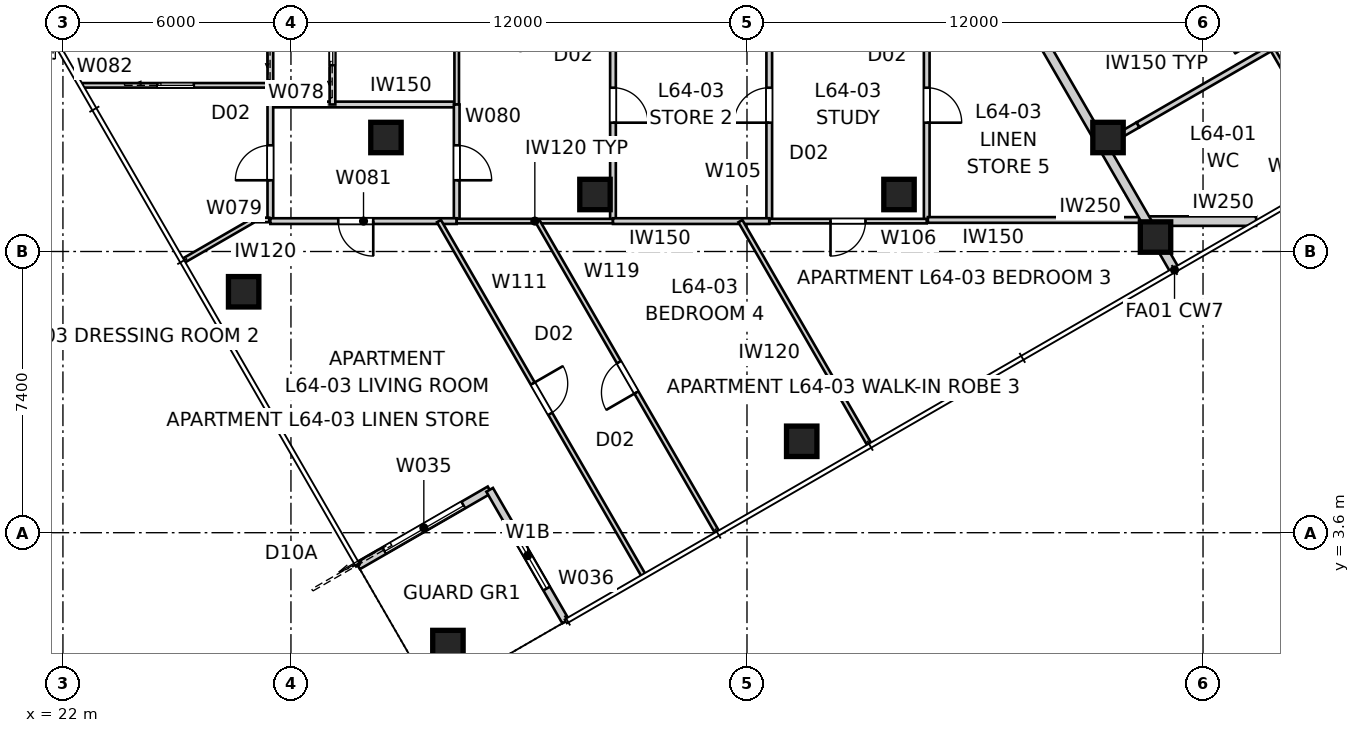
"""IFC4 building model, lengths in metres.
Left out: names, types, materials, properties, quantities, classifications, styles, units other than length and angle.
Written with IfcOpenShell. Run it as: python <this file> out.ifc"""

import sys

from ifc_helpers import new_model, si_unit, direction, frame, frame_2d, origin, origin_2d, place, context, subcontext, project, spatial, rectangle, extrude, element, fill, save


model = new_model("IFC4")
c1 = context("Model", 3, precision=1e-05, world=origin(), true_north=direction((0.0, 1.0)))
c2 = subcontext(c1, "Body", "Model", "MODEL_VIEW")
j1 = project(units=[si_unit("LENGTHUNIT", "METRE"), si_unit("PLANEANGLEUNIT", "RADIAN")], contexts=[c1])
p1 = place(None, origin())
s1 = spatial("IfcSite", under=j1, at=p1, CompositionType="ELEMENT")
p2 = place(p1, origin())
s2 = spatial("IfcBuilding", under=s1, at=p2, CompositionType="ELEMENT")
p3 = place(p2, frame((0.0, 0.0, 232.0)))
s3 = spatial("IfcBuildingStorey", under=s2, at=p3, CompositionType="ELEMENT", Elevation=232.0)
for number, where, z_axis, x_axis in (
    (1, (32.13, 0.63, 0.0), (0.0, 0.0, 1.0), (1.0, 0.0, 0.0)),
    (2, (41.44, 6.005, 0.0), (0.0, 0.0, 1.0), (1.0, 0.0, 0.0)),
    (3, (50.75, 11.38, 0.0), (0.0, 0.0, 1.0), (1.0, 0.0, 0.0)),
    (4, (26.755, 9.94, 0.0), (0.0, 0.0, 1.0), (1.0, 0.0, 0.0)),
):
    element("IfcColumn", number, at=place(p3, frame(where, z_axis=z_axis, x_axis=x_axis)), inside=s3, PredefinedType="COLUMN", context=c2, shape_type="SweptSolid", body=[
        extrude(rectangle(XDim=0.8, YDim=0.8, at=origin_2d()), origin(), (0.0, 0.0, 1.0), 3.2),
    ])
for number, where, z_axis, x_axis in (
    (5, (30.5, 14.0, 0.0), (0.0, 0.0, 1.0), (1.0, 0.0, 0.0)),
    (6, (36.0, 12.5, 0.0), (0.0, 0.0, 1.0), (1.0, 0.0, 0.0)),
    (7, (44.0, 12.5, 0.0), (0.0, 0.0, 1.0), (1.0, 0.0, 0.0)),
    (8, (49.5, 14.0, 0.0), (0.0, 0.0, 1.0), (1.0, 0.0, 0.0)),
):
    element("IfcColumn", number, at=place(p3, frame(where, z_axis=z_axis, x_axis=x_axis)), inside=s3, PredefinedType="COLUMN", context=c2, shape_type="SweptSolid", body=[
        extrude(rectangle(XDim=0.8, YDim=0.8, at=origin_2d()), origin(), (0.0, 0.0, 1.0), 3.4),
    ])
p4 = place(p3, frame((29.764, 2.729, 0.0), z_axis=(0.0, 0.0, 1.0), x_axis=(0.866026010844, 0.49999894854, 0.0)))
e9 = element("IfcWall", 9, at=p4, inside=s3, PredefinedType="SOLIDWALL", context=c2, shape_type="SweptSolid", body=[
    extrude(rectangle(XDim=4.0, YDim=0.2, at=frame_2d((2.0, 0.0))), origin(), (0.0, 0.0, 1.0), 3.2),
])
p5 = place(p4, frame((0.8, 0.0, 0.0)))
e10 = element("IfcOpeningElement", 10, at=p5, cuts=e9, PredefinedType="OPENING", context=c2, shape_type="SweptSolid", body=[
    extrude(rectangle(XDim=2.4, YDim=2.1, at=frame_2d((1.2, 1.05))), frame((0.0, 0.11, 0.0), z_axis=(0.0, -1.0, 0.0), x_axis=(1.0, 0.0, 0.0)), (0.0, 0.0, 1.0), 0.22),
])
p6 = place(p3, frame((33.229, 4.729, 0.0), z_axis=(0.0, 0.0, 1.0), x_axis=(0.49999894854, -0.866026010844, 0.0)))
e11 = element("IfcWall", 11, at=p6, inside=s3, PredefinedType="SOLIDWALL", context=c2, shape_type="SweptSolid", body=[
    extrude(rectangle(XDim=4.0, YDim=0.2, at=frame_2d((2.0, 0.0))), origin(), (0.0, 0.0, 1.0), 3.2),
])
p7 = place(p6, frame((1.0, 0.0, 0.4)))
e12 = element("IfcOpeningElement", 12, at=p7, cuts=e11, PredefinedType="OPENING", context=c2, shape_type="SweptSolid", body=[
    extrude(rectangle(XDim=2.0, YDim=1.8, at=frame_2d((1.0, 0.9))), frame((0.0, 0.11, 0.0), z_axis=(0.0, -1.0, 0.0), x_axis=(1.0, 0.0, 0.0)), (0.0, 0.0, 1.0), 0.22),
])
p8 = place(p3, frame((51.25, 10.514, 0.0), z_axis=(0.0, 0.0, 1.0), x_axis=(-0.500008511703, 0.866020489494, 0.0)))
e13 = element("IfcWall", 13, at=p8, inside=s3, PredefinedType="PARTITIONING", context=c2, shape_type="SweptSolid", body=[
    extrude(rectangle(XDim=8.496, YDim=0.25, at=frame_2d((4.248, 0.0))), origin(), (0.0, 0.0, 1.0), 3.2),
])
p9 = place(p3, frame((55.678, 13.117, 0.0), z_axis=(0.0, 0.0, 1.0), x_axis=(-0.500024807712, 0.866011080572, 0.0)))
e14 = element("IfcWall", 14, at=p9, inside=s3, PredefinedType="PARTITIONING", context=c2, shape_type="SweptSolid", body=[
    extrude(rectangle(XDim=3.798, YDim=0.12, at=frame_2d((1.899, 0.0))), origin(), (0.0, 0.0, 1.0), 3.2),
])
p10 = place(p9, frame((1.399, 0.0, 0.0)))
e15 = element("IfcOpeningElement", 15, at=p10, cuts=e14, PredefinedType="OPENING", context=c2, shape_type="SweptSolid", body=[
    extrude(rectangle(XDim=0.96, YDim=2.1, at=frame_2d((0.48, 1.05))), frame((0.0, 0.07, 0.0), z_axis=(0.0, -1.0, 0.0), x_axis=(1.0, 0.0, 0.0)), (0.0, 0.0, 1.0), 0.14),
])
p11 = place(p3, frame((49.356, 13.795, 0.0), z_axis=(0.0, 0.0, 1.0), x_axis=(0.866087482489, 0.499892461112, 0.0)))
e16 = element("IfcWall", 16, at=p11, inside=s3, PredefinedType="SOLIDWALL", context=c2, shape_type="SweptSolid", body=[
    extrude(rectangle(XDim=1.077, YDim=0.15, at=frame_2d((0.539, 0.0))), origin(), (0.0, 0.0, 1.0), 2.0),
])
p12 = place(p3, frame((50.289, 14.333, 0.0), z_axis=(0.0, 0.0, 1.0), x_axis=(0.866002269112, 0.500040068287, 0.0)))
e17 = element("IfcWall", 17, at=p12, inside=s3, PredefinedType="SOLIDWALL", context=c2, shape_type="SweptSolid", body=[
    extrude(rectangle(XDim=4.059, YDim=0.15, at=frame_2d((2.029, 0.0))), origin(), (0.0, 0.0, 1.0), 3.2),
])
p13 = place(p3, frame((53.397, 11.8, 0.0), z_axis=(0.0, 0.0, 1.0), x_axis=(-1.0, 0.0, 0.0)))
e18 = element("IfcWall", 18, at=p13, inside=s3, PredefinedType="PARTITIONING", context=c2, shape_type="SweptSolid", body=[
    extrude(rectangle(XDim=2.889, YDim=0.25, at=frame_2d((1.444, 0.0))), origin(), (0.0, 0.0, 1.0), 3.2),
])
p14 = place(p3, frame((32.361, 14.869, 0.0), z_axis=(0.0, 0.0, 1.0), x_axis=(-1.0, 0.0, 0.0)))
e19 = element("IfcWall", 19, at=p14, inside=s3, PredefinedType="SOLIDWALL", context=c2, shape_type="SweptSolid", body=[
    extrude(rectangle(XDim=4.903, YDim=0.15, at=frame_2d((2.452, 0.0))), origin(), (0.0, 0.0, 1.0), 3.2),
])
p15 = place(p3, frame((32.361, 17.9, 0.0), z_axis=(0.0, 0.0, 1.0), x_axis=(0.0, -1.0, 0.0)))
e20 = element("IfcWall", 20, at=p15, inside=s3, PredefinedType="PARTITIONING", context=c2, shape_type="SweptSolid", body=[
    extrude(rectangle(XDim=3.031, YDim=0.12, at=frame_2d((1.516, 0.0))), origin(), (0.0, 0.0, 1.0), 3.2),
])
p16 = place(p3, frame((29.092, 14.869, 0.0), z_axis=(0.0, 0.0, 1.0), x_axis=(0.0, 1.0, 0.0)))
e21 = element("IfcWall", 21, at=p16, inside=s3, PredefinedType="SOLIDWALL", context=c2, shape_type="SweptSolid", body=[
    extrude(rectangle(XDim=3.031, YDim=0.15, at=frame_2d((1.516, 0.0))), origin(), (0.0, 0.0, 1.0), 3.2),
])
p17 = place(p16, frame((1.036, 0.0, 0.0)))
e22 = element("IfcOpeningElement", 22, at=p17, cuts=e21, PredefinedType="OPENING", context=c2, shape_type="SweptSolid", body=[
    extrude(rectangle(XDim=0.96, YDim=2.1, at=frame_2d((0.48, 1.05))), frame((0.0, 0.085, 0.0), z_axis=(0.0, -1.0, 0.0), x_axis=(1.0, 0.0, 0.0)), (0.0, 0.0, 1.0), 0.17),
])
p18 = place(p3, frame((27.458, 11.8, 0.0), z_axis=(0.0, 0.0, 1.0), x_axis=(0.0, 1.0, 0.0)))
e23 = element("IfcWall", 23, at=p18, inside=s3, PredefinedType="SOLIDWALL", context=c2, shape_type="SweptSolid", body=[
    extrude(rectangle(XDim=6.495, YDim=0.15, at=frame_2d((3.248, 0.0))), origin(), (0.0, 0.0, 1.0), 3.2),
])
p19 = place(p18, frame((4.569, 0.0, 0.0)))
e24 = element("IfcOpeningElement", 24, at=p19, cuts=e23, PredefinedType="OPENING", context=c2, shape_type="SweptSolid", body=[
    extrude(rectangle(XDim=0.96, YDim=2.0, at=frame_2d((0.48, 1.0))), frame((0.0, 0.085, 0.0), z_axis=(0.0, -1.0, 0.0), x_axis=(1.0, 0.0, 0.0)), (0.0, 0.0, 1.0), 0.17),
])
p20 = place(p18, frame((1.074, 0.0, 0.0)))
e25 = element("IfcOpeningElement", 25, at=p20, cuts=e23, PredefinedType="OPENING", context=c2, shape_type="SweptSolid", body=[
    extrude(rectangle(XDim=0.92, YDim=2.34, at=frame_2d((0.46, 1.17))), frame((0.0, 0.085, 0.0), z_axis=(0.0, -1.0, 0.0), x_axis=(1.0, 0.0, 0.0)), (0.0, 0.0, 1.0), 0.17),
])
p21 = place(p3, frame((32.361, 14.869, 0.0), z_axis=(0.0, 0.0, 1.0), x_axis=(0.0, -1.0, 0.0)))
e26 = element("IfcWall", 26, at=p21, inside=s3, PredefinedType="SOLIDWALL", context=c2, shape_type="SweptSolid", body=[
    extrude(rectangle(XDim=3.069, YDim=0.15, at=frame_2d((1.534, 0.0))), origin(), (0.0, 0.0, 1.0), 3.2),
])
p22 = place(p21, frame((1.074, 0.0, 0.0)))
e27 = element("IfcOpeningElement", 27, at=p22, cuts=e26, PredefinedType="OPENING", context=c2, shape_type="SweptSolid", body=[
    extrude(rectangle(XDim=0.92, YDim=2.1, at=frame_2d((0.46, 1.05))), frame((0.0, 0.085, 0.0), z_axis=(0.0, -1.0, 0.0), x_axis=(1.0, 0.0, 0.0)), (0.0, 0.0, 1.0), 0.17),
])
p23 = place(p3, frame((32.361, 11.8, 0.0), z_axis=(0.0, 0.0, 1.0), x_axis=(-1.0, 0.0, 0.0)))
e28 = element("IfcWall", 28, at=p23, inside=s3, PredefinedType="SOLIDWALL", context=c2, shape_type="SweptSolid", body=[
    extrude(rectangle(XDim=4.903, YDim=0.15, at=frame_2d((2.452, 0.0))), origin(), (0.0, 0.0, 1.0), 3.2),
])
p24 = place(p23, frame((2.196, 0.0, 0.0)))
e29 = element("IfcOpeningElement", 29, at=p24, cuts=e28, PredefinedType="OPENING", context=c2, shape_type="SweptSolid", body=[
    extrude(rectangle(XDim=0.92, YDim=2.34, at=frame_2d((0.46, 1.17))), frame((0.0, 0.085, 0.0), z_axis=(0.0, -1.0, 0.0), x_axis=(1.0, 0.0, 0.0)), (0.0, 0.0, 1.0), 0.17),
])
p25 = place(p3, frame((22.51, 15.373, 0.0), z_axis=(0.0, 0.0, 1.0), x_axis=(1.0, 0.0, 0.0)))
e30 = element("IfcWall", 30, at=p25, inside=s3, PredefinedType="PARTITIONING", context=c2, shape_type="SweptSolid", body=[
    extrude(rectangle(XDim=4.918, YDim=0.12, at=frame_2d((2.459, 0.0))), origin(), (0.0, 0.0, 1.0), 3.2),
])
p26 = place(p25, frame((1.973, 0.0, 0.0)))
e31 = element("IfcOpeningElement", 31, at=p26, cuts=e30, PredefinedType="OPENING", context=c2, shape_type="SweptSolid", body=[
    extrude(rectangle(XDim=0.96, YDim=2.1, at=frame_2d((0.48, 1.05))), frame((0.0, 0.07, 0.0), z_axis=(0.0, -1.0, 0.0), x_axis=(1.0, 0.0, 0.0)), (0.0, 0.0, 1.0), 0.14),
])
p27 = place(p3, frame((27.428, 11.83, 0.0), z_axis=(0.0, 0.0, 1.0), x_axis=(-1.0, 0.0, 0.0)))
e32 = element("IfcWall", 32, at=p27, inside=s3, PredefinedType="PARTITIONING", context=c2, shape_type="SweptSolid", body=[
    extrude(rectangle(XDim=0.421, YDim=0.12, at=frame_2d((0.211, 0.0))), origin(), (0.0, 0.0, 1.0), 3.2),
])
p28 = place(p3, frame((26.976, 11.8, 0.0), z_axis=(0.0, 0.0, 1.0), x_axis=(-0.866046860819, -0.499962833484, 0.0)))
e33 = element("IfcWall", 33, at=p28, inside=s3, PredefinedType="PARTITIONING", context=c2, shape_type="SweptSolid", body=[
    extrude(rectangle(XDim=2.081, YDim=0.12, at=frame_2d((1.041, 0.0))), origin(), (0.0, 0.0, 1.0), 3.2),
])
p29 = place(p3, frame((44.729, 17.9, 0.0), z_axis=(0.0, 0.0, 1.0), x_axis=(0.0, -1.0, 0.0)))
e34 = element("IfcWall", 34, at=p29, inside=s3, PredefinedType="SOLIDWALL", context=c2, shape_type="SweptSolid", body=[
    extrude(rectangle(XDim=6.1, YDim=0.15, at=frame_2d((3.05, 0.0))), origin(), (0.0, 0.0, 1.0), 3.2),
])
p30 = place(p29, frame((2.59, 0.0, 0.0)))
e35 = element("IfcOpeningElement", 35, at=p30, cuts=e34, PredefinedType="OPENING", context=c2, shape_type="SweptSolid", body=[
    extrude(rectangle(XDim=0.92, YDim=2.34, at=frame_2d((0.46, 1.17))), frame((0.0, 0.085, 0.0), z_axis=(0.0, -1.0, 0.0), x_axis=(1.0, 0.0, 0.0)), (0.0, 0.0, 1.0), 0.17),
])
p31 = place(p3, frame((40.586, 11.8, 0.0), z_axis=(0.0, 0.0, 1.0), x_axis=(0.0, 1.0, 0.0)))
e36 = element("IfcWall", 36, at=p31, inside=s3, PredefinedType="SOLIDWALL", context=c2, shape_type="SweptSolid", body=[
    extrude(rectangle(XDim=6.1, YDim=0.15, at=frame_2d((3.05, 0.0))), origin(), (0.0, 0.0, 1.0), 3.2),
])
p32 = place(p31, frame((2.59, 0.0, 0.0)))
e37 = element("IfcOpeningElement", 37, at=p32, cuts=e36, PredefinedType="OPENING", context=c2, shape_type="SweptSolid", body=[
    extrude(rectangle(XDim=0.92, YDim=2.34, at=frame_2d((0.46, 1.17))), frame((0.0, 0.085, 0.0), z_axis=(0.0, -1.0, 0.0), x_axis=(1.0, 0.0, 0.0)), (0.0, 0.0, 1.0), 0.17),
])
p33 = place(p3, frame((44.729, 11.8, 0.0), z_axis=(0.0, 0.0, 1.0), x_axis=(-1.0, 0.0, 0.0)))
e38 = element("IfcWall", 38, at=p33, inside=s3, PredefinedType="PARTITIONING", context=c2, shape_type="SweptSolid", body=[
    extrude(rectangle(XDim=4.144, YDim=0.12, at=frame_2d((2.072, 0.0))), origin(), (0.0, 0.0, 1.0), 3.2),
])
p34 = place(p33, frame((1.612, 0.0, 0.0)))
e39 = element("IfcOpeningElement", 39, at=p34, cuts=e38, PredefinedType="OPENING", context=c2, shape_type="SweptSolid", body=[
    extrude(rectangle(XDim=0.92, YDim=2.34, at=frame_2d((0.46, 1.17))), frame((0.0, 0.07, 0.0), z_axis=(0.0, -1.0, 0.0), x_axis=(1.0, 0.0, 0.0)), (0.0, 0.0, 1.0), 0.14),
])
p35 = place(p3, frame((50.491, 11.829, 0.0), z_axis=(0.0, 0.0, 1.0), x_axis=(-0.999999991834, 0.000127795526, 0.0)))
e40 = element("IfcWall", 40, at=p35, inside=s3, PredefinedType="SOLIDWALL", context=c2, shape_type="SweptSolid", body=[
    extrude(rectangle(XDim=5.731, YDim=0.15, at=frame_2d((2.866, 0.0))), origin(), (0.0, 0.0, 1.0), 3.2),
])
p36 = place(p3, frame((36.474, 17.9, 0.0), z_axis=(0.0, 0.0, 1.0), x_axis=(0.0, -1.0, 0.0)))
e41 = element("IfcWall", 41, at=p36, inside=s3, PredefinedType="SOLIDWALL", context=c2, shape_type="SweptSolid", body=[
    extrude(rectangle(XDim=6.1, YDim=0.15, at=frame_2d((3.05, 0.0))), origin(), (0.0, 0.0, 1.0), 3.2),
])
p37 = place(p36, frame((2.59, 0.0, 0.0)))
e42 = element("IfcOpeningElement", 42, at=p37, cuts=e41, PredefinedType="OPENING", context=c2, shape_type="SweptSolid", body=[
    extrude(rectangle(XDim=0.92, YDim=2.34, at=frame_2d((0.46, 1.17))), frame((0.0, 0.085, 0.0), z_axis=(0.0, -1.0, 0.0), x_axis=(1.0, 0.0, 0.0)), (0.0, 0.0, 1.0), 0.17),
])
p38 = place(p3, frame((36.474, 11.8, 0.0), z_axis=(0.0, 0.0, 1.0), x_axis=(-1.0, 0.0, 0.0)))
e43 = element("IfcWall", 43, at=p38, inside=s3, PredefinedType="PARTITIONING", context=c2, shape_type="SweptSolid", body=[
    extrude(rectangle(XDim=4.112, YDim=0.12, at=frame_2d((2.056, 0.0))), origin(), (0.0, 0.0, 1.0), 3.2),
])
p39 = place(p3, frame((40.586, 11.8, 0.0), z_axis=(0.0, 0.0, 1.0), x_axis=(-1.0, 0.0, 0.0)))
e44 = element("IfcWall", 44, at=p39, inside=s3, PredefinedType="SOLIDWALL", context=c2, shape_type="SweptSolid", body=[
    extrude(rectangle(XDim=4.112, YDim=0.15, at=frame_2d((2.056, 0.0))), origin(), (0.0, 0.0, 1.0), 3.2),
])
p40 = place(p3, frame((31.895, 11.8, 0.0), z_axis=(0.0, 0.0, 1.0), x_axis=(0.500002897658, -0.866023730815, 0.0)))
e45 = element("IfcWall", 45, at=p40, inside=s3, PredefinedType="PARTITIONING", context=c2, shape_type="SweptSolid", body=[
    extrude(rectangle(XDim=10.751, YDim=0.12, at=frame_2d((5.375, 0.0))), origin(), (0.0, 0.0, 1.0), 2.588),
])
p41 = place(p40, frame((4.935, 0.0, 0.0)))
e46 = element("IfcOpeningElement", 46, at=p41, cuts=e45, PredefinedType="OPENING", context=c2, shape_type="SweptSolid", body=[
    extrude(rectangle(XDim=0.92, YDim=2.34, at=frame_2d((0.46, 1.17))), frame((0.0, 0.07, 0.0), z_axis=(0.0, -1.0, 0.0), x_axis=(1.0, 0.0, 0.0)), (0.0, 0.0, 1.0), 0.14),
])
p42 = place(p3, frame((43.219, 5.924, 0.0), z_axis=(0.0, 0.0, 1.0), x_axis=(-0.500009005995, 0.866020204108, 0.0)))
e47 = element("IfcWall", 47, at=p42, inside=s3, PredefinedType="PARTITIONING", context=c2, shape_type="SweptSolid", body=[
    extrude(rectangle(XDim=6.785, YDim=0.12, at=frame_2d((3.393, 0.0))), origin(), (0.0, 0.0, 1.0), 3.2),
])
p43 = place(p3, frame((39.214, 3.612, 0.0), z_axis=(0.0, 0.0, 1.0), x_axis=(-0.49999364752, 0.86602907136, 0.0)))
e48 = element("IfcWall", 48, at=p43, inside=s3, PredefinedType="PARTITIONING", context=c2, shape_type="SweptSolid", body=[
    extrude(rectangle(XDim=9.455, YDim=0.12, at=frame_2d((4.728, 0.0))), origin(), (0.0, 0.0, 1.0), 3.2),
])
p44 = place(p43, frame((4.248, 0.0, 0.0)))
e49 = element("IfcOpeningElement", 49, at=p44, cuts=e48, PredefinedType="OPENING", context=c2, shape_type="SweptSolid", body=[
    extrude(rectangle(XDim=0.92, YDim=2.34, at=frame_2d((0.46, 1.17))), frame((0.0, 0.07, 0.0), z_axis=(0.0, -1.0, 0.0), x_axis=(1.0, 0.0, 0.0)), (0.0, 0.0, 1.0), 0.14),
])
p45 = place(p5, origin())
e50 = element("IfcDoor", 50, at=p45, inside=s3, OperationType="SLIDING_TO_LEFT", PredefinedType="DOOR", context=c2, shape_type="SweptSolid", body=[
    extrude(rectangle(XDim=2.4, YDim=2.1, at=frame_2d((1.2, 1.05))), frame((0.0, 0.025, 0.0), z_axis=(0.0, -1.0, 0.0), x_axis=(1.0, 0.0, 0.0)), (0.0, 0.0, 1.0), 0.05),
])
fill(e10, e50)
p46 = place(p7, origin())
e51 = element("IfcWindow", 51, at=p46, inside=s3, PartitioningType="SINGLE_PANEL", PredefinedType="WINDOW", context=c2, shape_type="SweptSolid", body=[
    extrude(rectangle(XDim=2.0, YDim=1.8, at=frame_2d((1.0, 0.9))), frame((0.0, 0.03, 0.0), z_axis=(0.0, -1.0, 0.0), x_axis=(1.0, 0.0, 0.0)), (0.0, 0.0, 1.0), 0.06),
])
fill(e12, e51)
p47 = place(p26, origin())
e52 = element("IfcDoor", 52, at=p47, inside=s3, OperationType="SLIDING_TO_LEFT", PredefinedType="DOOR", context=c2, shape_type="SweptSolid", body=[
    extrude(rectangle(XDim=0.96, YDim=2.1, at=frame_2d((0.48, 1.05))), frame((0.0, 0.025, 0.0), z_axis=(0.0, -1.0, 0.0), x_axis=(1.0, 0.0, 0.0)), (0.0, 0.0, 1.0), 0.05),
])
fill(e31, e52)
p48 = place(p20, origin())
e53 = element("IfcDoor", 53, at=p48, inside=s3, OperationType="SINGLE_SWING_LEFT", PredefinedType="DOOR", context=c2, shape_type="SweptSolid", body=[
    extrude(rectangle(XDim=0.92, YDim=2.34, at=frame_2d((0.46, 1.17))), frame((0.0, 0.025, 0.0), z_axis=(0.0, -1.0, 0.0), x_axis=(1.0, 0.0, 0.0)), (0.0, 0.0, 1.0), 0.05),
])
fill(e25, e53)
p49 = place(p17, origin())
e54 = element("IfcDoor", 54, at=p49, inside=s3, OperationType="SLIDING_TO_LEFT", PredefinedType="DOOR", context=c2, shape_type="SweptSolid", body=[
    extrude(rectangle(XDim=0.96, YDim=2.1, at=frame_2d((0.48, 1.05))), frame((0.0, 0.025, 0.0), z_axis=(0.0, -1.0, 0.0), x_axis=(1.0, 0.0, 0.0)), (0.0, 0.0, 1.0), 0.05),
])
fill(e22, e54)
p50 = place(p24, origin())
e55 = element("IfcDoor", 55, at=p50, inside=s3, OperationType="SINGLE_SWING_LEFT", PredefinedType="DOOR", context=c2, shape_type="SweptSolid", body=[
    extrude(rectangle(XDim=0.92, YDim=2.34, at=frame_2d((0.46, 1.17))), frame((0.0, 0.025, 0.0), z_axis=(0.0, -1.0, 0.0), x_axis=(1.0, 0.0, 0.0)), (0.0, 0.0, 1.0), 0.05),
])
fill(e29, e55)
p51 = place(p22, origin())
e56 = element("IfcDoor", 56, at=p51, inside=s3, OperationType="SINGLE_SWING_RIGHT", PredefinedType="DOOR", context=c2, shape_type="SweptSolid", body=[
    extrude(rectangle(XDim=0.92, YDim=2.1, at=frame_2d((0.46, 1.05))), frame((0.0, 0.025, 0.0), z_axis=(0.0, -1.0, 0.0), x_axis=(1.0, 0.0, 0.0)), (0.0, 0.0, 1.0), 0.05),
])
fill(e27, e56)
p52 = place(p41, origin())
e57 = element("IfcDoor", 57, at=p52, inside=s3, OperationType="SINGLE_SWING_LEFT", PredefinedType="DOOR", context=c2, shape_type="SweptSolid", body=[
    extrude(rectangle(XDim=0.92, YDim=2.34, at=frame_2d((0.46, 1.17))), frame((0.0, 0.025, 0.0), z_axis=(0.0, -1.0, 0.0), x_axis=(1.0, 0.0, 0.0)), (0.0, 0.0, 1.0), 0.05),
])
fill(e46, e57)
p53 = place(p37, origin())
e58 = element("IfcDoor", 58, at=p53, inside=s3, OperationType="SINGLE_SWING_RIGHT", PredefinedType="DOOR", context=c2, shape_type="SweptSolid", body=[
    extrude(rectangle(XDim=0.92, YDim=2.34, at=frame_2d((0.46, 1.17))), frame((0.0, 0.025, 0.0), z_axis=(0.0, -1.0, 0.0), x_axis=(1.0, 0.0, 0.0)), (0.0, 0.0, 1.0), 0.05),
])
fill(e42, e58)
p54 = place(p44, origin())
e59 = element("IfcDoor", 59, at=p54, inside=s3, OperationType="SINGLE_SWING_LEFT", PredefinedType="DOOR", context=c2, shape_type="SweptSolid", body=[
    extrude(rectangle(XDim=0.92, YDim=2.34, at=frame_2d((0.46, 1.17))), frame((0.0, 0.025, 0.0), z_axis=(0.0, -1.0, 0.0), x_axis=(1.0, 0.0, 0.0)), (0.0, 0.0, 1.0), 0.05),
])
fill(e49, e59)
p55 = place(p32, origin())
e60 = element("IfcDoor", 60, at=p55, inside=s3, OperationType="SINGLE_SWING_LEFT", PredefinedType="DOOR", context=c2, shape_type="SweptSolid", body=[
    extrude(rectangle(XDim=0.92, YDim=2.34, at=frame_2d((0.46, 1.17))), frame((0.0, 0.025, 0.0), z_axis=(0.0, -1.0, 0.0), x_axis=(1.0, 0.0, 0.0)), (0.0, 0.0, 1.0), 0.05),
])
fill(e37, e60)
p56 = place(p30, origin())
e61 = element("IfcDoor", 61, at=p56, inside=s3, OperationType="SINGLE_SWING_RIGHT", PredefinedType="DOOR", context=c2, shape_type="SweptSolid", body=[
    extrude(rectangle(XDim=0.92, YDim=2.34, at=frame_2d((0.46, 1.17))), frame((0.0, 0.025, 0.0), z_axis=(0.0, -1.0, 0.0), x_axis=(1.0, 0.0, 0.0)), (0.0, 0.0, 1.0), 0.05),
])
fill(e35, e61)
p57 = place(p34, origin())
e62 = element("IfcDoor", 62, at=p57, inside=s3, OperationType="SINGLE_SWING_RIGHT", PredefinedType="DOOR", context=c2, shape_type="SweptSolid", body=[
    extrude(rectangle(XDim=0.92, YDim=2.34, at=frame_2d((0.46, 1.17))), frame((0.0, 0.025, 0.0), z_axis=(0.0, -1.0, 0.0), x_axis=(1.0, 0.0, 0.0)), (0.0, 0.0, 1.0), 0.05),
])
fill(e39, e62)
save(model, sys.argv[1])
